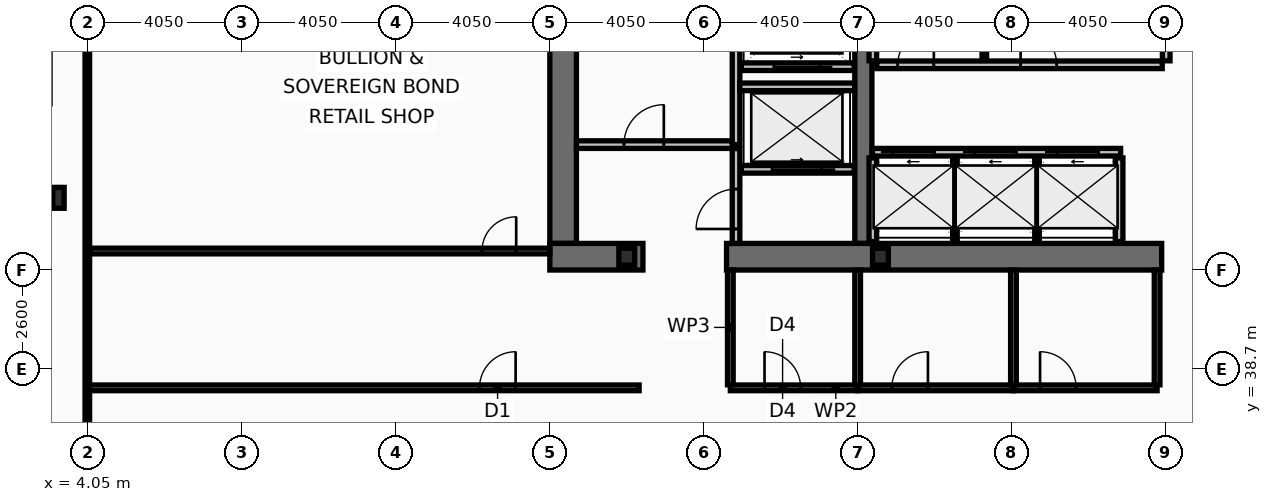
"""IFC4 building model, lengths in metres.
Left out: names, types, materials, properties, quantities, classifications, styles, units other than length and angle.
Written with IfcOpenShell. Run it as: python <this file> out.ifc"""

import sys

from ifc_helpers import new_model, si_unit, direction, frame, frame_2d, origin, origin_2d, place, context, subcontext, project, spatial, rectangle, i_section, extrude, element, fill, save


model = new_model("IFC4")
c1 = context("Model", 3, precision=1e-05, world=origin(), true_north=direction((0.0, 1.0)))
c2 = subcontext(c1, "Body", "Model", "MODEL_VIEW")
j1 = project(units=[si_unit("LENGTHUNIT", "METRE"), si_unit("PLANEANGLEUNIT", "RADIAN")], contexts=[c1])
p1 = place(None, origin())
s1 = spatial("IfcSite", under=j1, at=p1, CompositionType="ELEMENT")
p2 = place(p1, origin())
s2 = spatial("IfcBuilding", under=s1, at=p2, CompositionType="ELEMENT")
p3 = place(p2, frame((0.0, 0.0, 125.4)))
s3 = spatial("IfcBuildingStorey", under=s2, at=p3, CompositionType="ELEMENT", Elevation=125.4)
p4 = place(p3, frame((16.55, 42.0, 0.0), z_axis=(0.0, 0.0, 1.0), x_axis=(0.0, 1.0, 0.0)))
e1 = element("IfcWall", 1, at=p4, inside=s3, PredefinedType="SHEAR", context=c2, shape_type="SweptSolid", body=[
    extrude(rectangle(XDim=11.0, YDim=0.7, at=frame_2d((5.5, 0.0))), origin(), (0.0, 0.0, 1.0), 3.44),
])
p5 = place(p3, frame((24.45, 42.0, 0.0), z_axis=(0.0, 0.0, 1.0), x_axis=(0.0, 1.0, 0.0)))
e2 = element("IfcWall", 2, at=p5, inside=s3, PredefinedType="SHEAR", context=c2, shape_type="SweptSolid", body=[
    extrude(rectangle(XDim=11.0, YDim=0.45, at=frame_2d((5.5, 0.0))), origin(), (0.0, 0.0, 1.0), 3.44),
])
p6 = place(p3, frame((18.65, 41.65, 0.0), z_axis=(0.0, 0.0, 1.0), x_axis=(-1.0, 0.0, 0.0)))
e3 = element("IfcWall", 3, at=p6, inside=s3, PredefinedType="SHEAR", context=c2, shape_type="SweptSolid", body=[
    extrude(rectangle(XDim=2.45, YDim=0.7, at=frame_2d((1.225, 0.0))), origin(), (0.0, 0.0, 1.0), 3.44),
])
p7 = place(p3, frame((32.3, 41.65, 0.0), z_axis=(0.0, 0.0, 1.0), x_axis=(-1.0, 0.0, 0.0)))
e4 = element("IfcWall", 4, at=p7, inside=s3, PredefinedType="SHEAR", context=c2, shape_type="SweptSolid", body=[
    extrude(rectangle(XDim=11.45, YDim=0.7, at=frame_2d((5.725, 0.0))), origin(), (0.0, 0.0, 1.0), 3.44),
])
p8 = place(p3, frame((3.27, 43.2, 0.0), z_axis=(0.0, 0.0, 1.0), x_axis=(1.0, 0.0, 0.0)))
e5 = element("IfcColumn", 5, at=p8, inside=s3, PredefinedType="COLUMN", context=c2, shape_type="SweptSolid", body=[
    extrude(i_section(OverallWidth=0.3, OverallDepth=0.55, WebThickness=0.015, FlangeThickness=0.029, at=origin_2d()), origin(), (0.0, 0.0, 1.0), 3.6),
])
for number, where, z_axis, x_axis in (
    (6, (18.225, 41.65, 0.0), (0.0, 0.0, 1.0), (1.0, 0.0, 0.0)),
    (7, (24.9, 41.65, 0.0), (0.0, 0.0, 1.0), (1.0, 0.0, 0.0)),
):
    element("IfcColumn", number, at=place(p3, frame(where, z_axis=z_axis, x_axis=x_axis)), inside=s3, PredefinedType="COLUMN", context=c2, shape_type="SweptSolid", body=[
        extrude(i_section(OverallWidth=0.416, OverallDepth=0.446, WebThickness=0.039, FlangeThickness=0.063, at=origin_2d()), origin(), (0.0, 0.0, 1.0), 3.6),
    ])
p9 = place(p3, frame((24.69, 44.4, 0.0), z_axis=(0.0, 0.0, 1.0), x_axis=(1.0, 0.0, 0.0)))
e8 = element("IfcWall", 8, at=p9, inside=s3, PredefinedType="PARTITIONING", context=c2, shape_type="SweptSolid", body=[
    extrude(rectangle(XDim=6.53, YDim=0.2, at=frame_2d((3.265, 0.0))), origin(), (0.0, 0.0, 1.0), 3.44),
])
p10 = place(p9, frame((0.53, 0.0, 0.0)))
e9 = element("IfcOpeningElement", 9, at=p10, cuts=e8, PredefinedType="OPENING", context=c2, shape_type="SweptSolid", body=[
    extrude(rectangle(XDim=1.1, YDim=2.18, at=frame_2d((0.55, 1.09))), frame((0.0, 0.11, 0.0), z_axis=(0.0, -1.0, 0.0), x_axis=(1.0, 0.0, 0.0)), (0.0, 0.0, 1.0), 0.22),
])
p11 = place(p9, frame((2.69, 0.0, 0.0)))
e10 = element("IfcOpeningElement", 10, at=p11, cuts=e8, PredefinedType="OPENING", context=c2, shape_type="SweptSolid", body=[
    extrude(rectangle(XDim=1.1, YDim=2.18, at=frame_2d((0.55, 1.09))), frame((0.0, 0.11, 0.0), z_axis=(0.0, -1.0, 0.0), x_axis=(1.0, 0.0, 0.0)), (0.0, 0.0, 1.0), 0.22),
])
p12 = place(p9, frame((4.85, 0.0, 0.0)))
e11 = element("IfcOpeningElement", 11, at=p12, cuts=e8, PredefinedType="OPENING", context=c2, shape_type="SweptSolid", body=[
    extrude(rectangle(XDim=1.1, YDim=2.18, at=frame_2d((0.55, 1.09))), frame((0.0, 0.11, 0.0), z_axis=(0.0, -1.0, 0.0), x_axis=(1.0, 0.0, 0.0)), (0.0, 0.0, 1.0), 0.22),
])
p13 = place(p3, frame((24.21, 43.95, 0.0), z_axis=(0.0, 0.0, 1.0), x_axis=(-1.0, 0.0, 0.0)))
e12 = element("IfcWall", 12, at=p13, inside=s3, PredefinedType="PARTITIONING", context=c2, shape_type="SweptSolid", body=[
    extrude(rectangle(XDim=2.97, YDim=0.2, at=frame_2d((1.485, 0.0))), origin(), (0.0, 0.0, 1.0), 3.44),
])
p14 = place(p13, frame((0.86, 0.0, 0.0)))
e13 = element("IfcOpeningElement", 13, at=p14, cuts=e12, PredefinedType="OPENING", context=c2, shape_type="SweptSolid", body=[
    extrude(rectangle(XDim=1.3, YDim=2.18, at=frame_2d((0.65, 1.09))), frame((0.0, 0.11, 0.0), z_axis=(0.0, -1.0, 0.0), x_axis=(1.0, 0.0, 0.0)), (0.0, 0.0, 1.0), 0.22),
])
p15 = place(p3, frame((24.21, 46.65, 0.0), z_axis=(0.0, 0.0, 1.0), x_axis=(-1.0, 0.0, 0.0)))
e14 = element("IfcWall", 14, at=p15, inside=s3, PredefinedType="PARTITIONING", context=c2, shape_type="SweptSolid", body=[
    extrude(rectangle(XDim=2.97, YDim=0.2, at=frame_2d((1.485, 0.0))), origin(), (0.0, 0.0, 1.0), 3.44),
])
p16 = place(p15, frame((0.91, 0.0, 0.0)))
e15 = element("IfcOpeningElement", 15, at=p16, cuts=e14, PredefinedType="OPENING", context=c2, shape_type="SweptSolid", body=[
    extrude(rectangle(XDim=1.2, YDim=2.18, at=frame_2d((0.6, 1.09))), frame((0.0, 0.11, 0.0), z_axis=(0.0, -1.0, 0.0), x_axis=(1.0, 0.0, 0.0)), (0.0, 0.0, 1.0), 0.22),
])
p17 = place(p3, frame((21.1, 44.6, 0.0), z_axis=(0.0, 0.0, 1.0), x_axis=(0.0, 1.0, 0.0)))
e16 = element("IfcWall", 16, at=p17, inside=s3, PredefinedType="PARTITIONING", context=c2, shape_type="SweptSolid", body=[
    extrude(rectangle(XDim=4.3, YDim=0.2, at=frame_2d((2.15, 0.0))), origin(), (0.0, 0.0, 1.0), 3.44),
])
p18 = place(p3, frame((16.9, 44.6, 0.0), z_axis=(0.0, 0.0, 1.0), x_axis=(1.0, 0.0, 0.0)))
e17 = element("IfcWall", 17, at=p18, inside=s3, PredefinedType="PARTITIONING", context=c2, shape_type="SweptSolid", body=[
    extrude(rectangle(XDim=4.1, YDim=0.2, at=frame_2d((2.05, 0.0))), origin(), (0.0, 0.0, 1.0), 3.44),
])
p19 = place(p18, frame((1.25, 0.0, 0.0)))
e18 = element("IfcOpeningElement", 18, at=p19, cuts=e17, PredefinedType="OPENING", context=c2, shape_type="SweptSolid", body=[
    extrude(rectangle(XDim=1.05, YDim=2.15, at=frame_2d((0.525, 1.075))), frame((0.0, 0.11, 0.0), z_axis=(0.0, -1.0, 0.0), x_axis=(1.0, 0.0, 0.0)), (0.0, 0.0, 1.0), 0.22),
])
p20 = place(p3, frame((21.2, 46.12, 0.0), z_axis=(0.0, 0.0, 1.0), x_axis=(1.0, 0.0, 0.0)))
e19 = element("IfcWall", 19, at=p20, inside=s3, PredefinedType="PARTITIONING", context=c2, shape_type="SweptSolid", body=[
    extrude(rectangle(XDim=3.02, YDim=0.2, at=frame_2d((1.51, 0.0))), origin(), (0.0, 0.0, 1.0), 3.44),
])
p21 = place(p3, frame((21.1, 42.0, 0.0), z_axis=(0.0, 0.0, 1.0), x_axis=(0.0, 1.0, 0.0)))
e20 = element("IfcWall", 20, at=p21, inside=s3, PredefinedType="PARTITIONING", context=c2, shape_type="SweptSolid", body=[
    extrude(rectangle(XDim=2.495, YDim=0.2, at=frame_2d((1.248, 0.0))), origin(), (0.0, 0.0, 1.0), 3.44),
])
p22 = place(p21, frame((0.38, 0.0, 0.0)))
e21 = element("IfcOpeningElement", 21, at=p22, cuts=e20, PredefinedType="OPENING", context=c2, shape_type="SweptSolid", body=[
    extrude(rectangle(XDim=1.05, YDim=2.15, at=frame_2d((0.525, 1.075))), frame((0.0, 0.11, 0.0), z_axis=(0.0, -1.0, 0.0), x_axis=(1.0, 0.0, 0.0)), (0.0, 0.0, 1.0), 0.22),
])
for number, where, z_axis, x_axis in (
    (22, (24.7, 46.805, 0.0), (0.0, 0.0, 1.0), (0.0, 1.0, 0.0)),
    (23, (32.42, 46.805, 0.0), (0.0, 0.0, 1.0), (0.0, 1.0, 0.0)),
):
    element("IfcWall", number, at=place(p3, frame(where, z_axis=z_axis, x_axis=x_axis)), inside=s3, PredefinedType="PARTITIONING", context=c2, shape_type="SweptSolid", body=[
        extrude(rectangle(XDim=5.99, YDim=0.2, at=frame_2d((2.995, 0.0))), origin(), (0.0, 0.0, 1.0), 3.44),
    ])
p23 = place(p3, frame((27.634, 46.805, 0.0), z_axis=(0.0, 0.0, 1.0), x_axis=(0.0, 1.0, 0.0)))
e24 = element("IfcWall", 24, at=p23, inside=s3, PredefinedType="PARTITIONING", context=c2, shape_type="SweptSolid", body=[
    extrude(rectangle(XDim=5.99, YDim=0.12, at=frame_2d((2.995, 0.0))), origin(), (0.0, 0.0, 1.0), 3.44),
])
p24 = place(p3, frame((24.805, 46.7, 0.0), z_axis=(0.0, 0.0, 1.0), x_axis=(1.0, 0.0, 0.0)))
e25 = element("IfcWall", 25, at=p24, inside=s3, PredefinedType="PARTITIONING", context=c2, shape_type="SweptSolid", body=[
    extrude(rectangle(XDim=7.51, YDim=0.2, at=frame_2d((3.755, 0.0))), origin(), (0.0, 0.0, 1.0), 3.44),
])
p25 = place(p24, frame((0.55, 0.0, 0.0)))
e26 = element("IfcOpeningElement", 26, at=p25, cuts=e25, PredefinedType="OPENING", context=c2, shape_type="SweptSolid", body=[
    extrude(rectangle(XDim=0.95, YDim=2.1, at=frame_2d((0.475, 1.05))), frame((0.0, 0.11, 0.0), z_axis=(0.0, -1.0, 0.0), x_axis=(1.0, 0.0, 0.0)), (0.0, 0.0, 1.0), 0.22),
])
p26 = place(p24, frame((3.784, 0.0, 0.0)))
e27 = element("IfcOpeningElement", 27, at=p26, cuts=e25, PredefinedType="OPENING", context=c2, shape_type="SweptSolid", body=[
    extrude(rectangle(XDim=0.95, YDim=2.1, at=frame_2d((0.475, 1.05))), frame((0.0, 0.11, 0.0), z_axis=(0.0, -1.0, 0.0), x_axis=(1.0, 0.0, 0.0)), (0.0, 0.0, 1.0), 0.22),
])
for number, where, z_axis, x_axis in (
    (28, (24.7, 42.05, 0.0), (0.0, 0.0, 1.0), (0.0, 1.0, 0.0)),
    (29, (31.18, 42.05, 0.0), (0.0, 0.0, 1.0), (0.0, 1.0, 0.0)),
):
    element("IfcWall", number, at=place(p3, frame(where, z_axis=z_axis, x_axis=x_axis)), inside=s3, PredefinedType="PARTITIONING", context=c2, shape_type="SweptSolid", body=[
        extrude(rectangle(XDim=2.2, YDim=0.2, at=frame_2d((1.1, 0.0))), origin(), (0.0, 0.0, 1.0), 3.44),
    ])
for number, where, z_axis, x_axis in (
    (30, (26.86, 42.05, 0.0), (0.0, 0.0, 1.0), (0.0, 1.0, 0.0)),
    (31, (29.02, 42.05, 0.0), (0.0, 0.0, 1.0), (0.0, 1.0, 0.0)),
):
    element("IfcWall", number, at=place(p3, frame(where, z_axis=z_axis, x_axis=x_axis)), inside=s3, PredefinedType="PARTITIONING", context=c2, shape_type="SweptSolid", body=[
        extrude(rectangle(XDim=2.2, YDim=0.12, at=frame_2d((1.1, 0.0))), origin(), (0.0, 0.0, 1.0), 3.44),
    ])
p27 = place(p3, frame((20.95, 38.2, 0.0), z_axis=(0.0, 0.0, 1.0), x_axis=(1.0, 0.0, 0.0)))
e32 = element("IfcWall", 32, at=p27, inside=s3, PredefinedType="PARTITIONING", context=c2, shape_type="SweptSolid", body=[
    extrude(rectangle(XDim=3.35, YDim=0.15, at=frame_2d((1.675, 0.0))), origin(), (0.0, 0.0, 1.0), 3.44),
])
p28 = place(p27, frame((0.9, 0.0, 0.0)))
e33 = element("IfcOpeningElement", 33, at=p28, cuts=e32, PredefinedType="OPENING", context=c2, shape_type="SweptSolid", body=[
    extrude(rectangle(XDim=0.95, YDim=2.05, at=frame_2d((0.475, 1.025))), frame((0.0, 0.085, 0.0), z_axis=(0.0, -1.0, 0.0), x_axis=(1.0, 0.0, 0.0)), (0.0, 0.0, 1.0), 0.17),
])
p29 = place(p3, frame((24.3, 38.2, 0.0), z_axis=(0.0, 0.0, 1.0), x_axis=(1.0, 0.0, 0.0)))
e34 = element("IfcWall", 34, at=p29, inside=s3, PredefinedType="PARTITIONING", context=c2, shape_type="SweptSolid", body=[
    extrude(rectangle(XDim=4.1, YDim=0.15, at=frame_2d((2.05, 0.0))), origin(), (0.0, 0.0, 1.0), 2.73),
])
p30 = place(p29, frame((0.9, 0.0, 0.0)))
e35 = element("IfcOpeningElement", 35, at=p30, cuts=e34, PredefinedType="OPENING", context=c2, shape_type="SweptSolid", body=[
    extrude(rectangle(XDim=0.95, YDim=2.05, at=frame_2d((0.475, 1.025))), frame((0.0, 0.085, 0.0), z_axis=(0.0, -1.0, 0.0), x_axis=(1.0, 0.0, 0.0)), (0.0, 0.0, 1.0), 0.17),
])
p31 = place(p3, frame((28.4, 38.2, 0.0), z_axis=(0.0, 0.0, 1.0), x_axis=(1.0, 0.0, 0.0)))
e36 = element("IfcWall", 36, at=p31, inside=s3, PredefinedType="PARTITIONING", context=c2, shape_type="SweptSolid", body=[
    extrude(rectangle(XDim=3.78, YDim=0.15, at=frame_2d((1.89, 0.0))), origin(), (0.0, 0.0, 1.0), 2.73),
])
p32 = place(p31, frame((0.7, 0.0, 0.0)))
e37 = element("IfcOpeningElement", 37, at=p32, cuts=e36, PredefinedType="OPENING", context=c2, shape_type="SweptSolid", body=[
    extrude(rectangle(XDim=0.95, YDim=2.05, at=frame_2d((0.475, 1.025))), frame((0.0, 0.085, 0.0), z_axis=(0.0, -1.0, 0.0), x_axis=(1.0, 0.0, 0.0)), (0.0, 0.0, 1.0), 0.17),
])
for number, where, z_axis, x_axis in (
    (38, (20.95, 38.28, 0.0), (0.0, 0.0, 1.0), (0.0, 1.0, 0.0)),
    (39, (24.3, 38.28, 0.0), (0.0, 0.0, 1.0), (0.0, 1.0, 0.0)),
    (40, (28.4, 38.28, 0.0), (0.0, 0.0, 1.0), (0.0, 1.0, 0.0)),
    (41, (32.18, 38.28, 0.0), (0.0, 0.0, 1.0), (0.0, 1.0, 0.0)),
):
    element("IfcWall", number, at=place(p3, frame(where, z_axis=z_axis, x_axis=x_axis)), inside=s3, PredefinedType="PARTITIONING", context=c2, shape_type="SweptSolid", body=[
        extrude(rectangle(XDim=3.02, YDim=0.15, at=frame_2d((1.51, 0.0))), origin(), (0.0, 0.0, 1.0), 3.44),
    ])
p33 = place(p3, frame((4.03, 38.2, 0.0), z_axis=(0.0, 0.0, 1.0), x_axis=(1.0, 0.0, 0.0)))
e42 = element("IfcWall", 42, at=p33, inside=s3, PredefinedType="PARTITIONING", context=c2, shape_type="SweptSolid", body=[
    extrude(rectangle(XDim=14.52, YDim=0.15, at=frame_2d((7.26, 0.0))), origin(), (0.0, 0.0, 1.0), 2.73),
])
p34 = place(p33, frame((10.32, 0.0, 0.0)))
e43 = element("IfcOpeningElement", 43, at=p34, cuts=e42, PredefinedType="OPENING", context=c2, shape_type="SweptSolid", body=[
    extrude(rectangle(XDim=0.95, YDim=2.05, at=frame_2d((0.475, 1.025))), frame((0.0, 0.085, 0.0), z_axis=(0.0, -1.0, 0.0), x_axis=(1.0, 0.0, 0.0)), (0.0, 0.0, 1.0), 0.17),
])
p35 = place(p3, frame((4.095, 41.8, 0.0), z_axis=(0.0, 0.0, 1.0), x_axis=(1.0, 0.0, 0.0)))
e44 = element("IfcWall", 44, at=p35, inside=s3, PredefinedType="PARTITIONING", context=c2, shape_type="SweptSolid", body=[
    extrude(rectangle(XDim=12.105, YDim=0.15, at=frame_2d((6.052, 0.0))), origin(), (0.0, 0.0, 1.0), 3.44),
])
p36 = place(p35, frame((10.32, 0.0, 0.0)))
e45 = element("IfcOpeningElement", 45, at=p36, cuts=e44, PredefinedType="OPENING", context=c2, shape_type="SweptSolid", body=[
    extrude(rectangle(XDim=0.9, YDim=2.05, at=frame_2d((0.45, 1.025))), frame((0.0, 0.085, 0.0), z_axis=(0.0, -1.0, 0.0), x_axis=(1.0, 0.0, 0.0)), (0.0, 0.0, 1.0), 0.17),
])
p37 = place(p3, frame((4.03, 10.665, 0.0), z_axis=(0.0, 0.0, 1.0), x_axis=(0.0, 1.0, 0.0)))
e46 = element("IfcWall", 46, at=p37, inside=s3, PredefinedType="PARTITIONING", context=c2, shape_type="SweptSolid", body=[
    extrude(rectangle(XDim=42.11, YDim=0.12, at=frame_2d((21.055, 0.0))), origin(), (0.0, 0.0, 1.0), 2.73),
])
p38 = place(p10, origin())
e47 = element("IfcDoor", 47, at=p38, inside=s3, OperationType="SLIDING_TO_LEFT", PredefinedType="DOOR", context=c2, shape_type="SweptSolid", body=[
    extrude(rectangle(XDim=1.1, YDim=2.18, at=frame_2d((0.55, 1.09))), frame((0.0, 0.025, 0.0), z_axis=(0.0, -1.0, 0.0), x_axis=(1.0, 0.0, 0.0)), (0.0, 0.0, 1.0), 0.05),
])
fill(e9, e47)
p39 = place(p11, origin())
e48 = element("IfcDoor", 48, at=p39, inside=s3, OperationType="SLIDING_TO_LEFT", PredefinedType="DOOR", context=c2, shape_type="SweptSolid", body=[
    extrude(rectangle(XDim=1.1, YDim=2.18, at=frame_2d((0.55, 1.09))), frame((0.0, 0.025, 0.0), z_axis=(0.0, -1.0, 0.0), x_axis=(1.0, 0.0, 0.0)), (0.0, 0.0, 1.0), 0.05),
])
fill(e10, e48)
p40 = place(p12, origin())
e49 = element("IfcDoor", 49, at=p40, inside=s3, OperationType="SLIDING_TO_LEFT", PredefinedType="DOOR", context=c2, shape_type="SweptSolid", body=[
    extrude(rectangle(XDim=1.1, YDim=2.18, at=frame_2d((0.55, 1.09))), frame((0.0, 0.025, 0.0), z_axis=(0.0, -1.0, 0.0), x_axis=(1.0, 0.0, 0.0)), (0.0, 0.0, 1.0), 0.05),
])
fill(e11, e49)
p41 = place(p14, origin())
e50 = element("IfcDoor", 50, at=p41, inside=s3, OperationType="SLIDING_TO_LEFT", PredefinedType="DOOR", context=c2, shape_type="SweptSolid", body=[
    extrude(rectangle(XDim=1.3, YDim=2.18, at=frame_2d((0.65, 1.09))), frame((0.0, 0.025, 0.0), z_axis=(0.0, -1.0, 0.0), x_axis=(1.0, 0.0, 0.0)), (0.0, 0.0, 1.0), 0.05),
])
fill(e13, e50)
p42 = place(p16, origin())
e51 = element("IfcDoor", 51, at=p42, inside=s3, OperationType="SLIDING_TO_LEFT", PredefinedType="DOOR", context=c2, shape_type="SweptSolid", body=[
    extrude(rectangle(XDim=1.2, YDim=2.18, at=frame_2d((0.6, 1.09))), frame((0.0, 0.025, 0.0), z_axis=(0.0, -1.0, 0.0), x_axis=(1.0, 0.0, 0.0)), (0.0, 0.0, 1.0), 0.05),
])
fill(e15, e51)
p43 = place(p19, origin())
e52 = element("IfcDoor", 52, at=p43, inside=s3, OperationType="SINGLE_SWING_RIGHT", PredefinedType="DOOR", context=c2, shape_type="SweptSolid", body=[
    extrude(rectangle(XDim=1.05, YDim=2.15, at=frame_2d((0.525, 1.075))), frame((0.0, 0.025, 0.0), z_axis=(0.0, -1.0, 0.0), x_axis=(1.0, 0.0, 0.0)), (0.0, 0.0, 1.0), 0.05),
])
fill(e18, e52)
p44 = place(p22, origin())
e53 = element("IfcDoor", 53, at=p44, inside=s3, OperationType="SINGLE_SWING_LEFT", PredefinedType="DOOR", context=c2, shape_type="SweptSolid", body=[
    extrude(rectangle(XDim=1.05, YDim=2.15, at=frame_2d((0.525, 1.075))), frame((0.0, 0.025, 0.0), z_axis=(0.0, -1.0, 0.0), x_axis=(1.0, 0.0, 0.0)), (0.0, 0.0, 1.0), 0.05),
])
fill(e21, e53)
p45 = place(p25, origin())
e54 = element("IfcDoor", 54, at=p45, inside=s3, OperationType="SINGLE_SWING_RIGHT", PredefinedType="DOOR", context=c2, shape_type="SweptSolid", body=[
    extrude(rectangle(XDim=0.95, YDim=2.1, at=frame_2d((0.475, 1.05))), frame((0.0, 0.025, 0.0), z_axis=(0.0, -1.0, 0.0), x_axis=(1.0, 0.0, 0.0)), (0.0, 0.0, 1.0), 0.05),
])
fill(e26, e54)
p46 = place(p26, origin())
e55 = element("IfcDoor", 55, at=p46, inside=s3, OperationType="SINGLE_SWING_LEFT", PredefinedType="DOOR", context=c2, shape_type="SweptSolid", body=[
    extrude(rectangle(XDim=0.95, YDim=2.1, at=frame_2d((0.475, 1.05))), frame((0.0, 0.025, 0.0), z_axis=(0.0, -1.0, 0.0), x_axis=(1.0, 0.0, 0.0)), (0.0, 0.0, 1.0), 0.05),
])
fill(e27, e55)
p47 = place(p28, origin())
e56 = element("IfcDoor", 56, at=p47, inside=s3, OperationType="SINGLE_SWING_LEFT", PredefinedType="DOOR", context=c2, shape_type="SweptSolid", body=[
    extrude(rectangle(XDim=0.95, YDim=2.05, at=frame_2d((0.475, 1.025))), frame((0.0, 0.025, 0.0), z_axis=(0.0, -1.0, 0.0), x_axis=(1.0, 0.0, 0.0)), (0.0, 0.0, 1.0), 0.05),
])
fill(e33, e56)
p48 = place(p30, origin())
e57 = element("IfcDoor", 57, at=p48, inside=s3, OperationType="SINGLE_SWING_RIGHT", PredefinedType="DOOR", context=c2, shape_type="SweptSolid", body=[
    extrude(rectangle(XDim=0.95, YDim=2.05, at=frame_2d((0.475, 1.025))), frame((0.0, 0.025, 0.0), z_axis=(0.0, -1.0, 0.0), x_axis=(1.0, 0.0, 0.0)), (0.0, 0.0, 1.0), 0.05),
])
fill(e35, e57)
p49 = place(p32, origin())
e58 = element("IfcDoor", 58, at=p49, inside=s3, OperationType="SINGLE_SWING_LEFT", PredefinedType="DOOR", context=c2, shape_type="SweptSolid", body=[
    extrude(rectangle(XDim=0.95, YDim=2.05, at=frame_2d((0.475, 1.025))), frame((0.0, 0.025, 0.0), z_axis=(0.0, -1.0, 0.0), x_axis=(1.0, 0.0, 0.0)), (0.0, 0.0, 1.0), 0.05),
])
fill(e37, e58)
p50 = place(p34, origin())
e59 = element("IfcDoor", 59, at=p50, inside=s3, OperationType="SINGLE_SWING_RIGHT", PredefinedType="DOOR", context=c2, shape_type="SweptSolid", body=[
    extrude(rectangle(XDim=0.95, YDim=2.05, at=frame_2d((0.475, 1.025))), frame((0.0, 0.025, 0.0), z_axis=(0.0, -1.0, 0.0), x_axis=(1.0, 0.0, 0.0)), (0.0, 0.0, 1.0), 0.05),
])
fill(e43, e59)
p51 = place(p36, origin())
e60 = element("IfcDoor", 60, at=p51, inside=s3, OperationType="SINGLE_SWING_RIGHT", PredefinedType="DOOR", context=c2, shape_type="SweptSolid", body=[
    extrude(rectangle(XDim=0.9, YDim=2.05, at=frame_2d((0.45, 1.025))), frame((0.0, 0.025, 0.0), z_axis=(0.0, -1.0, 0.0), x_axis=(1.0, 0.0, 0.0)), (0.0, 0.0, 1.0), 0.05),
])
fill(e45, e60)
save(model, sys.argv[1])
